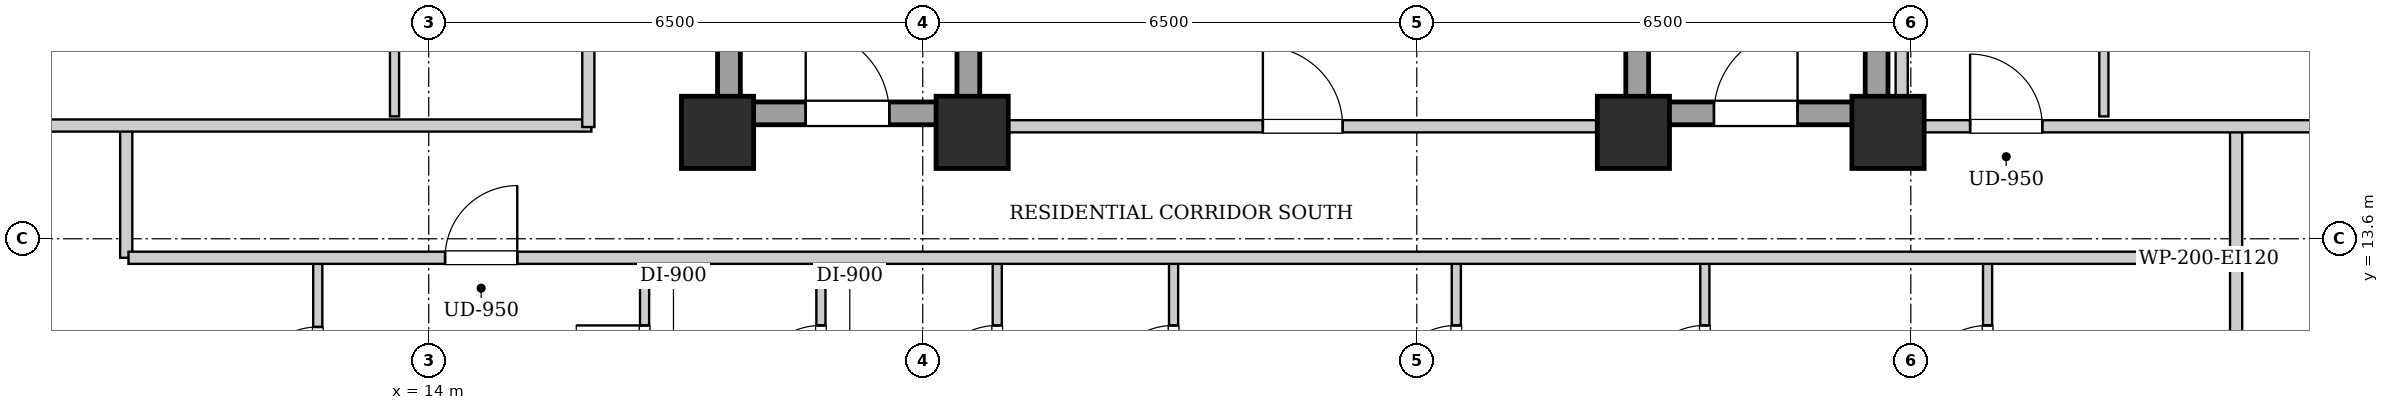
"""IFC4 building model, lengths in metres.
Left out: names, types, materials, properties, quantities, classifications, styles, units other than length and angle.
Written with IfcOpenShell. Run it as: python <this file> out.ifc"""

import sys

from ifc_helpers import new_model, si_unit, direction, frame, frame_2d, origin, origin_2d, place, context, subcontext, project, spatial, rectangle, extrude, element, fill, save


model = new_model("IFC4")
c1 = context("Model", 3, precision=1e-05, world=origin(), true_north=direction((0.0, 1.0)))
c2 = subcontext(c1, "Body", "Model", "MODEL_VIEW")
j1 = project(units=[si_unit("LENGTHUNIT", "METRE"), si_unit("PLANEANGLEUNIT", "RADIAN")], contexts=[c1])
p1 = place(None, origin())
s1 = spatial("IfcSite", under=j1, at=p1, CompositionType="ELEMENT")
p2 = place(p1, origin())
s2 = spatial("IfcBuilding", under=s1, at=p2, CompositionType="ELEMENT")
p3 = place(p2, frame((0.0, 0.0, 130.9)))
s3 = spatial("IfcBuildingStorey", under=s2, at=p3, CompositionType="ELEMENT", Elevation=130.9)
for number, where, z_axis, x_axis in (
    (1, (17.8, 15.0, 0.0), (0.0, 0.0, 1.0), (1.0, 0.0, 0.0)),
    (2, (21.15, 15.0, 0.0), (0.0, 0.0, 1.0), (1.0, 0.0, 0.0)),
    (3, (29.85, 15.0, 0.0), (0.0, 0.0, 1.0), (1.0, 0.0, 0.0)),
    (4, (33.2, 15.0, 0.0), (0.0, 0.0, 1.0), (1.0, 0.0, 0.0)),
):
    element("IfcColumn", number, at=place(p3, frame(where, z_axis=z_axis, x_axis=x_axis)), inside=s3, PredefinedType="COLUMN", context=c2, shape_type="SweptSolid", body=[
        extrude(rectangle(XDim=0.95, YDim=0.95, at=origin_2d()), origin(), (0.0, 0.0, 1.0), 3.25),
    ])
for number, where, z_axis, x_axis in (
    (5, (17.95, 15.1, 0.0), (0.0, 0.0, 1.0), (0.0, 1.0, 0.0)),
    (6, (21.1, 15.1, 0.0), (0.0, 0.0, 1.0), (0.0, 1.0, 0.0)),
):
    element("IfcWall", number, at=place(p3, frame(where, z_axis=z_axis, x_axis=x_axis)), inside=s3, PredefinedType="SHEAR", context=c2, shape_type="SweptSolid", body=[
        extrude(rectangle(XDim=9.0, YDim=0.3, at=frame_2d((4.5, 0.0))), origin(), (0.0, 0.0, 1.0), 2.99),
    ])
p4 = place(p3, frame((18.1, 15.25, 0.0), z_axis=(0.0, 0.0, 1.0), x_axis=(1.0, 0.0, 0.0)))
e7 = element("IfcWall", 7, at=p4, inside=s3, PredefinedType="SHEAR", context=c2, shape_type="SweptSolid", body=[
    extrude(rectangle(XDim=2.85, YDim=0.3, at=frame_2d((1.425, 0.0))), origin(), (0.0, 0.0, 1.0), 2.99),
])
p5 = place(p4, frame((0.86, 0.0, 0.0)))
e8 = element("IfcOpeningElement", 8, at=p5, cuts=e7, PredefinedType="OPENING", context=c2, shape_type="SweptSolid", body=[
    extrude(rectangle(XDim=1.1, YDim=2.05, at=frame_2d((0.55, 1.025))), frame((0.0, 0.16, 0.0), z_axis=(0.0, -1.0, 0.0), x_axis=(1.0, 0.0, 0.0)), (0.0, 0.0, 1.0), 0.32),
])
for number, where, z_axis, x_axis in (
    (9, (29.9, 15.1, 0.0), (0.0, 0.0, 1.0), (0.0, 1.0, 0.0)),
    (10, (33.05, 15.1, 0.0), (0.0, 0.0, 1.0), (0.0, 1.0, 0.0)),
):
    element("IfcWall", number, at=place(p3, frame(where, z_axis=z_axis, x_axis=x_axis)), inside=s3, PredefinedType="SHEAR", context=c2, shape_type="SweptSolid", body=[
        extrude(rectangle(XDim=9.0, YDim=0.3, at=frame_2d((4.5, 0.0))), origin(), (0.0, 0.0, 1.0), 2.99),
    ])
p6 = place(p3, frame((30.05, 15.25, 0.0), z_axis=(0.0, 0.0, 1.0), x_axis=(1.0, 0.0, 0.0)))
e11 = element("IfcWall", 11, at=p6, inside=s3, PredefinedType="SHEAR", context=c2, shape_type="SweptSolid", body=[
    extrude(rectangle(XDim=2.85, YDim=0.3, at=frame_2d((1.425, 0.0))), origin(), (0.0, 0.0, 1.0), 2.99),
])
p7 = place(p6, frame((0.86, 0.0, 0.0)))
e12 = element("IfcOpeningElement", 12, at=p7, cuts=e11, PredefinedType="OPENING", context=c2, shape_type="SweptSolid", body=[
    extrude(rectangle(XDim=1.1, YDim=2.05, at=frame_2d((0.55, 1.025))), frame((0.0, 0.16, 0.0), z_axis=(0.0, -1.0, 0.0), x_axis=(1.0, 0.0, 0.0)), (0.0, 0.0, 1.0), 0.32),
])
p8 = place(p3, frame((21.25, 15.08, 0.0), z_axis=(0.0, 0.0, 1.0), x_axis=(1.0, 0.0, 0.0)))
e13 = element("IfcWall", 13, at=p8, inside=s3, PredefinedType="PARTITIONING", context=c2, shape_type="SweptSolid", body=[
    extrude(rectangle(XDim=8.5, YDim=0.16, at=frame_2d((4.25, 0.0))), origin(), (0.0, 0.0, 1.0), 2.426),
])
p9 = place(p8, frame((3.725, 0.0, 0.0)))
e14 = element("IfcOpeningElement", 14, at=p9, cuts=e13, PredefinedType="OPENING", context=c2, shape_type="SweptSolid", body=[
    extrude(rectangle(XDim=1.05, YDim=2.05, at=frame_2d((0.525, 1.025))), frame((0.0, 0.09, 0.0), z_axis=(0.0, -1.0, 0.0), x_axis=(1.0, 0.0, 0.0)), (0.0, 0.0, 1.0), 0.18),
])
for number, where, z_axis, x_axis in (
    (15, (10.02, 13.35, 0.0), (0.0, 0.0, 1.0), (0.0, 1.0, 0.0)),
    (16, (37.78, 13.35, 0.0), (0.0, 0.0, 1.0), (0.0, 1.0, 0.0)),
):
    element("IfcWall", number, at=place(p3, frame(where, z_axis=z_axis, x_axis=x_axis)), inside=s3, PredefinedType="PARTITIONING", context=c2, shape_type="SweptSolid", body=[
        extrude(rectangle(XDim=1.74, YDim=0.16, at=frame_2d((0.87, 0.0))), origin(), (0.0, 0.0, 1.0), 2.99),
    ])
p10 = place(p3, frame((7.78, 15.09, 0.0), z_axis=(0.0, 0.0, 1.0), x_axis=(1.0, 0.0, 0.0)))
e17 = element("IfcWall", 17, at=p10, inside=s3, PredefinedType="PARTITIONING", context=c2, shape_type="SweptSolid", body=[
    extrude(rectangle(XDim=8.36, YDim=0.16, at=frame_2d((4.18, 0.0))), origin(), (0.0, 0.0, 1.0), 2.426),
])
p11 = place(p3, frame((37.78, 10.65, 0.0), z_axis=(0.0, 0.0, 1.0), x_axis=(0.0, 1.0, 0.0)))
e18 = element("IfcWall", 18, at=p11, inside=s3, PredefinedType="PARTITIONING", context=c2, shape_type="SweptSolid", body=[
    extrude(rectangle(XDim=2.66, YDim=0.16, at=frame_2d((1.33, 0.0))), origin(), (0.0, 0.0, 1.0), 2.99),
])
p12 = place(p3, frame((12.54, 10.71, 0.0), z_axis=(0.0, 0.0, 1.0), x_axis=(0.0, 1.0, 0.0)))
e19 = element("IfcWall", 19, at=p12, inside=s3, PredefinedType="PARTITIONING", context=c2, shape_type="SweptSolid", body=[
    extrude(rectangle(XDim=2.6, YDim=0.12, at=frame_2d((1.3, 0.0))), origin(), (0.0, 0.0, 1.0), 2.99),
])
p13 = place(p12, frame((0.87, 0.0, 0.0)))
e20 = element("IfcOpeningElement", 20, at=p13, cuts=e19, PredefinedType="OPENING", context=c2, shape_type="SweptSolid", body=[
    extrude(rectangle(XDim=0.86, YDim=2.05, at=frame_2d((0.43, 1.025))), frame((0.0, 0.07, 0.0), z_axis=(0.0, -1.0, 0.0), x_axis=(1.0, 0.0, 0.0)), (0.0, 0.0, 1.0), 0.14),
])
p14 = place(p3, frame((16.84, 10.71, 0.0), z_axis=(0.0, 0.0, 1.0), x_axis=(0.0, 1.0, 0.0)))
e21 = element("IfcWall", 21, at=p14, inside=s3, PredefinedType="PARTITIONING", context=c2, shape_type="SweptSolid", body=[
    extrude(rectangle(XDim=2.6, YDim=0.12, at=frame_2d((1.3, 0.0))), origin(), (0.0, 0.0, 1.0), 2.99),
])
p15 = place(p14, frame((0.85, 0.0, 0.0)))
e22 = element("IfcOpeningElement", 22, at=p15, cuts=e21, PredefinedType="OPENING", context=c2, shape_type="SweptSolid", body=[
    extrude(rectangle(XDim=0.9, YDim=2.05, at=frame_2d((0.45, 1.025))), frame((0.0, 0.07, 0.0), z_axis=(0.0, -1.0, 0.0), x_axis=(1.0, 0.0, 0.0)), (0.0, 0.0, 1.0), 0.14),
])
p16 = place(p3, frame((19.16, 10.71, 0.0), z_axis=(0.0, 0.0, 1.0), x_axis=(0.0, 1.0, 0.0)))
e23 = element("IfcWall", 23, at=p16, inside=s3, PredefinedType="PARTITIONING", context=c2, shape_type="SweptSolid", body=[
    extrude(rectangle(XDim=2.6, YDim=0.12, at=frame_2d((1.3, 0.0))), origin(), (0.0, 0.0, 1.0), 2.99),
])
p17 = place(p16, frame((0.85, 0.0, 0.0)))
e24 = element("IfcOpeningElement", 24, at=p17, cuts=e23, PredefinedType="OPENING", context=c2, shape_type="SweptSolid", body=[
    extrude(rectangle(XDim=0.9, YDim=2.05, at=frame_2d((0.45, 1.025))), frame((0.0, 0.07, 0.0), z_axis=(0.0, -1.0, 0.0), x_axis=(1.0, 0.0, 0.0)), (0.0, 0.0, 1.0), 0.14),
])
p18 = place(p3, frame((21.48, 10.71, 0.0), z_axis=(0.0, 0.0, 1.0), x_axis=(0.0, 1.0, 0.0)))
e25 = element("IfcWall", 25, at=p18, inside=s3, PredefinedType="PARTITIONING", context=c2, shape_type="SweptSolid", body=[
    extrude(rectangle(XDim=2.6, YDim=0.12, at=frame_2d((1.3, 0.0))), origin(), (0.0, 0.0, 1.0), 2.99),
])
p19 = place(p18, frame((0.85, 0.0, 0.0)))
e26 = element("IfcOpeningElement", 26, at=p19, cuts=e25, PredefinedType="OPENING", context=c2, shape_type="SweptSolid", body=[
    extrude(rectangle(XDim=0.9, YDim=2.05, at=frame_2d((0.45, 1.025))), frame((0.0, 0.07, 0.0), z_axis=(0.0, -1.0, 0.0), x_axis=(1.0, 0.0, 0.0)), (0.0, 0.0, 1.0), 0.14),
])
p20 = place(p3, frame((23.8, 10.71, 0.0), z_axis=(0.0, 0.0, 1.0), x_axis=(0.0, 1.0, 0.0)))
e27 = element("IfcWall", 27, at=p20, inside=s3, PredefinedType="PARTITIONING", context=c2, shape_type="SweptSolid", body=[
    extrude(rectangle(XDim=2.6, YDim=0.12, at=frame_2d((1.3, 0.0))), origin(), (0.0, 0.0, 1.0), 2.99),
])
p21 = place(p20, frame((0.85, 0.0, 0.0)))
e28 = element("IfcOpeningElement", 28, at=p21, cuts=e27, PredefinedType="OPENING", context=c2, shape_type="SweptSolid", body=[
    extrude(rectangle(XDim=0.9, YDim=2.05, at=frame_2d((0.45, 1.025))), frame((0.0, 0.07, 0.0), z_axis=(0.0, -1.0, 0.0), x_axis=(1.0, 0.0, 0.0)), (0.0, 0.0, 1.0), 0.14),
])
p22 = place(p3, frame((27.52, 10.71, 0.0), z_axis=(0.0, 0.0, 1.0), x_axis=(0.0, 1.0, 0.0)))
e29 = element("IfcWall", 29, at=p22, inside=s3, PredefinedType="PARTITIONING", context=c2, shape_type="SweptSolid", body=[
    extrude(rectangle(XDim=2.6, YDim=0.12, at=frame_2d((1.3, 0.0))), origin(), (0.0, 0.0, 1.0), 2.99),
])
p23 = place(p22, frame((0.85, 0.0, 0.0)))
e30 = element("IfcOpeningElement", 30, at=p23, cuts=e29, PredefinedType="OPENING", context=c2, shape_type="SweptSolid", body=[
    extrude(rectangle(XDim=0.9, YDim=2.05, at=frame_2d((0.45, 1.025))), frame((0.0, 0.07, 0.0), z_axis=(0.0, -1.0, 0.0), x_axis=(1.0, 0.0, 0.0)), (0.0, 0.0, 1.0), 0.14),
])
p24 = place(p3, frame((30.79, 10.71, 0.0), z_axis=(0.0, 0.0, 1.0), x_axis=(0.0, 1.0, 0.0)))
e31 = element("IfcWall", 31, at=p24, inside=s3, PredefinedType="PARTITIONING", context=c2, shape_type="SweptSolid", body=[
    extrude(rectangle(XDim=2.6, YDim=0.12, at=frame_2d((1.3, 0.0))), origin(), (0.0, 0.0, 1.0), 2.99),
])
p25 = place(p24, frame((0.85, 0.0, 0.0)))
e32 = element("IfcOpeningElement", 32, at=p25, cuts=e31, PredefinedType="OPENING", context=c2, shape_type="SweptSolid", body=[
    extrude(rectangle(XDim=0.9, YDim=2.05, at=frame_2d((0.45, 1.025))), frame((0.0, 0.07, 0.0), z_axis=(0.0, -1.0, 0.0), x_axis=(1.0, 0.0, 0.0)), (0.0, 0.0, 1.0), 0.14),
])
p26 = place(p3, frame((34.51, 10.71, 0.0), z_axis=(0.0, 0.0, 1.0), x_axis=(0.0, 1.0, 0.0)))
e33 = element("IfcWall", 33, at=p26, inside=s3, PredefinedType="PARTITIONING", context=c2, shape_type="SweptSolid", body=[
    extrude(rectangle(XDim=2.6, YDim=0.12, at=frame_2d((1.3, 0.0))), origin(), (0.0, 0.0, 1.0), 2.99),
])
p27 = place(p26, frame((0.85, 0.0, 0.0)))
e34 = element("IfcOpeningElement", 34, at=p27, cuts=e33, PredefinedType="OPENING", context=c2, shape_type="SweptSolid", body=[
    extrude(rectangle(XDim=0.9, YDim=2.05, at=frame_2d((0.45, 1.025))), frame((0.0, 0.07, 0.0), z_axis=(0.0, -1.0, 0.0), x_axis=(1.0, 0.0, 0.0)), (0.0, 0.0, 1.0), 0.14),
])
p28 = place(p3, frame((13.55, 15.21, 0.0), z_axis=(0.0, 0.0, 1.0), x_axis=(0.0, 1.0, 0.0)))
e35 = element("IfcWall", 35, at=p28, inside=s3, PredefinedType="PARTITIONING", context=c2, shape_type="SweptSolid", body=[
    extrude(rectangle(XDim=1.85, YDim=0.12, at=frame_2d((0.925, 0.0))), origin(), (0.0, 0.0, 1.0), 2.99),
])
p29 = place(p3, frame((33.38, 15.08, 0.0), z_axis=(0.0, 0.0, 1.0), x_axis=(1.0, 0.0, 0.0)))
e36 = element("IfcWall", 36, at=p29, inside=s3, PredefinedType="PARTITIONING", context=c2, shape_type="SweptSolid", body=[
    extrude(rectangle(XDim=6.64, YDim=0.16, at=frame_2d((3.32, 0.0))), origin(), (0.0, 0.0, 1.0), 2.426),
])
p30 = place(p29, frame((0.9, 0.0, 0.0)))
e37 = element("IfcOpeningElement", 37, at=p30, cuts=e36, PredefinedType="OPENING", context=c2, shape_type="SweptSolid", body=[
    extrude(rectangle(XDim=0.95, YDim=2.1, at=frame_2d((0.475, 1.05))), frame((0.0, 0.09, 0.0), z_axis=(0.0, -1.0, 0.0), x_axis=(1.0, 0.0, 0.0)), (0.0, 0.0, 1.0), 0.18),
])
p31 = place(p3, frame((36.04, 15.21, 0.0), z_axis=(0.0, 0.0, 1.0), x_axis=(0.0, 1.0, 0.0)))
e38 = element("IfcWall", 38, at=p31, inside=s3, PredefinedType="PARTITIONING", context=c2, shape_type="SweptSolid", body=[
    extrude(rectangle(XDim=4.308, YDim=0.12, at=frame_2d((2.154, 0.0))), origin(), (0.0, 0.0, 1.0), 2.99),
])
p32 = place(p31, frame((1.704, 0.0, 0.0)))
e39 = element("IfcOpeningElement", 39, at=p32, cuts=e38, PredefinedType="OPENING", context=c2, shape_type="SweptSolid", body=[
    extrude(rectangle(XDim=0.9, YDim=2.05, at=frame_2d((0.45, 1.025))), frame((0.0, 0.07, 0.0), z_axis=(0.0, -1.0, 0.0), x_axis=(1.0, 0.0, 0.0)), (0.0, 0.0, 1.0), 0.14),
])
p33 = place(p3, frame((10.05, 13.35, 0.0), z_axis=(0.0, 0.0, 1.0), x_axis=(1.0, 0.0, 0.0)))
e40 = element("IfcWall", 40, at=p33, inside=s3, PredefinedType="PARTITIONING", context=c2, shape_type="SweptSolid", body=[
    extrude(rectangle(XDim=27.7, YDim=0.16, at=frame_2d((13.85, 0.0))), origin(), (0.0, 0.0, 1.0), 2.99),
])
p34 = place(p33, frame((4.165, 0.0, 0.0)))
e41 = element("IfcOpeningElement", 41, at=p34, cuts=e40, PredefinedType="OPENING", context=c2, shape_type="SweptSolid", body=[
    extrude(rectangle(XDim=0.95, YDim=2.1, at=frame_2d((0.475, 1.05))), frame((0.0, 0.09, 0.0), z_axis=(0.0, -1.0, 0.0), x_axis=(1.0, 0.0, 0.0)), (0.0, 0.0, 1.0), 0.18),
])
p35 = place(p3, frame((16.1, 15.07, 0.0), z_axis=(0.0, 0.0, 1.0), x_axis=(0.0, 1.0, 0.0)))
e42 = element("IfcWall", 42, at=p35, inside=s3, PredefinedType="PARTITIONING", context=c2, shape_type="SweptSolid", body=[
    extrude(rectangle(XDim=13.93, YDim=0.16, at=frame_2d((6.965, 0.0))), origin(), (0.0, 0.0, 1.0), 2.99),
])
p36 = place(p35, frame((3.608, 0.0, 0.0)))
e43 = element("IfcOpeningElement", 43, at=p36, cuts=e42, PredefinedType="OPENING", context=c2, shape_type="SweptSolid", body=[
    extrude(rectangle(XDim=0.95, YDim=2.1, at=frame_2d((0.475, 1.05))), frame((0.0, 0.09, 0.0), z_axis=(0.0, -1.0, 0.0), x_axis=(1.0, 0.0, 0.0)), (0.0, 0.0, 1.0), 0.18),
])
p37 = place(p35, frame((10.649, 0.0, 0.0)))
e44 = element("IfcOpeningElement", 44, at=p37, cuts=e42, PredefinedType="OPENING", context=c2, shape_type="SweptSolid", body=[
    extrude(rectangle(XDim=0.95, YDim=2.1, at=frame_2d((0.475, 1.05))), frame((0.0, 0.09, 0.0), z_axis=(0.0, -1.0, 0.0), x_axis=(1.0, 0.0, 0.0)), (0.0, 0.0, 1.0), 0.18),
])
p38 = place(p3, frame((33.38, 15.02, 0.0), z_axis=(0.0, 0.0, 1.0), x_axis=(0.0, 1.0, 0.0)))
e45 = element("IfcWall", 45, at=p38, inside=s3, PredefinedType="PARTITIONING", context=c2, shape_type="SweptSolid", body=[
    extrude(rectangle(XDim=13.98, YDim=0.16, at=frame_2d((6.99, 0.0))), origin(), (0.0, 0.0, 1.0), 2.99),
])
p39 = place(p5, origin())
e46 = element("IfcDoor", 46, at=p39, inside=s3, OperationType="SINGLE_SWING_LEFT", PredefinedType="DOOR", context=c2, shape_type="SweptSolid", body=[
    extrude(rectangle(XDim=1.1, YDim=2.05, at=frame_2d((0.55, 1.025))), frame((0.0, 0.025, 0.0), z_axis=(0.0, -1.0, 0.0), x_axis=(1.0, 0.0, 0.0)), (0.0, 0.0, 1.0), 0.05),
])
fill(e8, e46)
p40 = place(p7, origin())
e47 = element("IfcDoor", 47, at=p40, inside=s3, OperationType="SINGLE_SWING_RIGHT", PredefinedType="DOOR", context=c2, shape_type="SweptSolid", body=[
    extrude(rectangle(XDim=1.1, YDim=2.05, at=frame_2d((0.55, 1.025))), frame((0.0, 0.025, 0.0), z_axis=(0.0, -1.0, 0.0), x_axis=(1.0, 0.0, 0.0)), (0.0, 0.0, 1.0), 0.05),
])
fill(e12, e47)
p41 = place(p9, origin())
e48 = element("IfcDoor", 48, at=p41, inside=s3, OperationType="SINGLE_SWING_LEFT", PredefinedType="DOOR", context=c2, shape_type="SweptSolid", body=[
    extrude(rectangle(XDim=1.05, YDim=2.05, at=frame_2d((0.525, 1.025))), frame((0.0, 0.025, 0.0), z_axis=(0.0, -1.0, 0.0), x_axis=(1.0, 0.0, 0.0)), (0.0, 0.0, 1.0), 0.05),
])
fill(e14, e48)
p42 = place(p13, origin())
e49 = element("IfcDoor", 49, at=p42, inside=s3, OperationType="SINGLE_SWING_LEFT", PredefinedType="DOOR", context=c2, shape_type="SweptSolid", body=[
    extrude(rectangle(XDim=0.86, YDim=2.05, at=frame_2d((0.43, 1.025))), frame((0.0, 0.025, 0.0), z_axis=(0.0, -1.0, 0.0), x_axis=(1.0, 0.0, 0.0)), (0.0, 0.0, 1.0), 0.05),
])
fill(e20, e49)
p43 = place(p15, origin())
e50 = element("IfcDoor", 50, at=p43, inside=s3, OperationType="SINGLE_SWING_RIGHT", PredefinedType="DOOR", context=c2, shape_type="SweptSolid", body=[
    extrude(rectangle(XDim=0.9, YDim=2.05, at=frame_2d((0.45, 1.025))), frame((0.0, 0.025, 0.0), z_axis=(0.0, -1.0, 0.0), x_axis=(1.0, 0.0, 0.0)), (0.0, 0.0, 1.0), 0.05),
])
fill(e22, e50)
p44 = place(p17, origin())
e51 = element("IfcDoor", 51, at=p44, inside=s3, OperationType="SINGLE_SWING_LEFT", PredefinedType="DOOR", context=c2, shape_type="SweptSolid", body=[
    extrude(rectangle(XDim=0.9, YDim=2.05, at=frame_2d((0.45, 1.025))), frame((0.0, 0.025, 0.0), z_axis=(0.0, -1.0, 0.0), x_axis=(1.0, 0.0, 0.0)), (0.0, 0.0, 1.0), 0.05),
])
fill(e24, e51)
p45 = place(p19, origin())
e52 = element("IfcDoor", 52, at=p45, inside=s3, OperationType="SINGLE_SWING_LEFT", PredefinedType="DOOR", context=c2, shape_type="SweptSolid", body=[
    extrude(rectangle(XDim=0.9, YDim=2.05, at=frame_2d((0.45, 1.025))), frame((0.0, 0.025, 0.0), z_axis=(0.0, -1.0, 0.0), x_axis=(1.0, 0.0, 0.0)), (0.0, 0.0, 1.0), 0.05),
])
fill(e26, e52)
p46 = place(p21, origin())
e53 = element("IfcDoor", 53, at=p46, inside=s3, OperationType="SINGLE_SWING_LEFT", PredefinedType="DOOR", context=c2, shape_type="SweptSolid", body=[
    extrude(rectangle(XDim=0.9, YDim=2.05, at=frame_2d((0.45, 1.025))), frame((0.0, 0.025, 0.0), z_axis=(0.0, -1.0, 0.0), x_axis=(1.0, 0.0, 0.0)), (0.0, 0.0, 1.0), 0.05),
])
fill(e28, e53)
p47 = place(p23, origin())
e54 = element("IfcDoor", 54, at=p47, inside=s3, OperationType="SINGLE_SWING_LEFT", PredefinedType="DOOR", context=c2, shape_type="SweptSolid", body=[
    extrude(rectangle(XDim=0.9, YDim=2.05, at=frame_2d((0.45, 1.025))), frame((0.0, 0.025, 0.0), z_axis=(0.0, -1.0, 0.0), x_axis=(1.0, 0.0, 0.0)), (0.0, 0.0, 1.0), 0.05),
])
fill(e30, e54)
p48 = place(p25, origin())
e55 = element("IfcDoor", 55, at=p48, inside=s3, OperationType="SINGLE_SWING_LEFT", PredefinedType="DOOR", context=c2, shape_type="SweptSolid", body=[
    extrude(rectangle(XDim=0.9, YDim=2.05, at=frame_2d((0.45, 1.025))), frame((0.0, 0.025, 0.0), z_axis=(0.0, -1.0, 0.0), x_axis=(1.0, 0.0, 0.0)), (0.0, 0.0, 1.0), 0.05),
])
fill(e32, e55)
p49 = place(p27, origin())
e56 = element("IfcDoor", 56, at=p49, inside=s3, OperationType="SINGLE_SWING_LEFT", PredefinedType="DOOR", context=c2, shape_type="SweptSolid", body=[
    extrude(rectangle(XDim=0.9, YDim=2.05, at=frame_2d((0.45, 1.025))), frame((0.0, 0.025, 0.0), z_axis=(0.0, -1.0, 0.0), x_axis=(1.0, 0.0, 0.0)), (0.0, 0.0, 1.0), 0.05),
])
fill(e34, e56)
p50 = place(p30, origin())
e57 = element("IfcDoor", 57, at=p50, inside=s3, OperationType="SINGLE_SWING_LEFT", PredefinedType="DOOR", context=c2, shape_type="SweptSolid", body=[
    extrude(rectangle(XDim=0.95, YDim=2.1, at=frame_2d((0.475, 1.05))), frame((0.0, 0.025, 0.0), z_axis=(0.0, -1.0, 0.0), x_axis=(1.0, 0.0, 0.0)), (0.0, 0.0, 1.0), 0.05),
])
fill(e37, e57)
p51 = place(p34, origin())
e58 = element("IfcDoor", 58, at=p51, inside=s3, OperationType="SINGLE_SWING_RIGHT", PredefinedType="DOOR", context=c2, shape_type="SweptSolid", body=[
    extrude(rectangle(XDim=0.95, YDim=2.1, at=frame_2d((0.475, 1.05))), frame((0.0, 0.025, 0.0), z_axis=(0.0, -1.0, 0.0), x_axis=(1.0, 0.0, 0.0)), (0.0, 0.0, 1.0), 0.05),
])
fill(e41, e58)
save(model, sys.argv[1])
